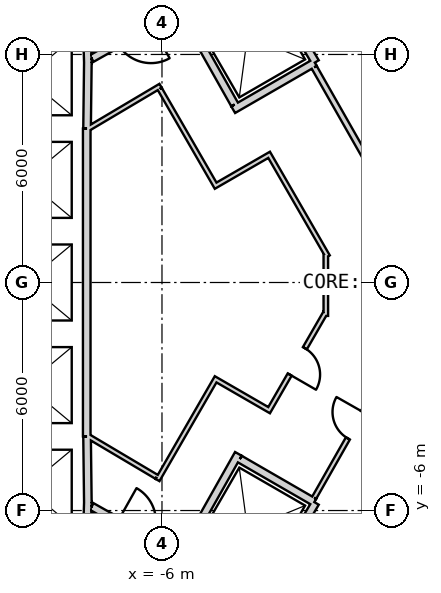
"""IFC4 building model, lengths in metres.
Left out: names, types, materials, properties, quantities, classifications, styles, units other than length and angle.
Written with IfcOpenShell. Run it as: python <this file> out.ifc"""

import sys

from ifc_helpers import new_model, si_unit, direction, frame, frame_2d, origin, place, context, subcontext, project, spatial, rectangle, extrude, element, fill, save


model = new_model("IFC4")
c1 = context("Model", 3, precision=1e-05, world=origin(), true_north=direction((0.0, 1.0)))
c2 = subcontext(c1, "Body", "Model", "MODEL_VIEW")
j1 = project(units=[si_unit("LENGTHUNIT", "METRE"), si_unit("PLANEANGLEUNIT", "RADIAN")], contexts=[c1])
p1 = place(None, origin())
s1 = spatial("IfcSite", under=j1, at=p1, CompositionType="ELEMENT")
p2 = place(p1, origin())
s2 = spatial("IfcBuilding", under=s1, at=p2, CompositionType="ELEMENT")
p3 = place(p2, frame((0.0, 0.0, 70.1)))
s3 = spatial("IfcBuildingStorey", under=s2, at=p3, CompositionType="ELEMENT", Elevation=70.1)
p4 = place(p3, frame((19.475, 2.208, 0.0), z_axis=(0.0, 0.0, 1.0), x_axis=(-0.866028369851, 0.499994862586, 0.0)))
e1 = element("IfcWall", 1, at=p4, inside=s3, PredefinedType="SHEAR", context=c2, shape_type="SweptSolid", body=[
    extrude(rectangle(XDim=31.523, YDim=0.9, at=frame_2d((15.762, 0.0))), origin(), (0.0, 0.0, 1.0), 4.1),
])
p5 = place(p4, frame((7.062, 0.0, 0.0)))
e2 = element("IfcOpeningElement", 2, at=p5, cuts=e1, PredefinedType="OPENING", context=c2, shape_type="SweptSolid", body=[
    extrude(rectangle(XDim=1.2, YDim=2.4, at=frame_2d((0.6, 1.2))), frame((0.0, 0.46, 0.0), z_axis=(0.0, -1.0, 0.0), x_axis=(1.0, 0.0, 0.0)), (0.0, 0.0, 1.0), 0.92),
])
p6 = place(p4, frame((9.762, 0.0, 0.0)))
e3 = element("IfcOpeningElement", 3, at=p6, cuts=e1, PredefinedType="OPENING", context=c2, shape_type="SweptSolid", body=[
    extrude(rectangle(XDim=1.2, YDim=2.4, at=frame_2d((0.6, 1.2))), frame((0.0, 0.46, 0.0), z_axis=(0.0, -1.0, 0.0), x_axis=(1.0, 0.0, 0.0)), (0.0, 0.0, 1.0), 0.92),
])
p7 = place(p4, frame((12.462, 0.0, 0.0)))
e4 = element("IfcOpeningElement", 4, at=p7, cuts=e1, PredefinedType="OPENING", context=c2, shape_type="SweptSolid", body=[
    extrude(rectangle(XDim=1.2, YDim=2.4, at=frame_2d((0.6, 1.2))), frame((0.0, 0.46, 0.0), z_axis=(0.0, -1.0, 0.0), x_axis=(1.0, 0.0, 0.0)), (0.0, 0.0, 1.0), 0.92),
])
p8 = place(p4, frame((15.162, 0.0, 0.0)))
e5 = element("IfcOpeningElement", 5, at=p8, cuts=e1, PredefinedType="OPENING", context=c2, shape_type="SweptSolid", body=[
    extrude(rectangle(XDim=1.2, YDim=2.4, at=frame_2d((0.6, 1.2))), frame((0.0, 0.46, 0.0), z_axis=(0.0, -1.0, 0.0), x_axis=(1.0, 0.0, 0.0)), (0.0, 0.0, 1.0), 0.92),
])
p9 = place(p4, frame((17.862, 0.0, 0.0)))
e6 = element("IfcOpeningElement", 6, at=p9, cuts=e1, PredefinedType="OPENING", context=c2, shape_type="SweptSolid", body=[
    extrude(rectangle(XDim=1.2, YDim=2.4, at=frame_2d((0.6, 1.2))), frame((0.0, 0.46, 0.0), z_axis=(0.0, -1.0, 0.0), x_axis=(1.0, 0.0, 0.0)), (0.0, 0.0, 1.0), 0.92),
])
p10 = place(p4, frame((20.562, 0.0, 0.0)))
e7 = element("IfcOpeningElement", 7, at=p10, cuts=e1, PredefinedType="OPENING", context=c2, shape_type="SweptSolid", body=[
    extrude(rectangle(XDim=1.2, YDim=2.4, at=frame_2d((0.6, 1.2))), frame((0.0, 0.46, 0.0), z_axis=(0.0, -1.0, 0.0), x_axis=(1.0, 0.0, 0.0)), (0.0, 0.0, 1.0), 0.92),
])
p11 = place(p4, frame((23.262, 0.0, 0.0)))
e8 = element("IfcOpeningElement", 8, at=p11, cuts=e1, PredefinedType="OPENING", context=c2, shape_type="SweptSolid", body=[
    extrude(rectangle(XDim=1.2, YDim=2.4, at=frame_2d((0.6, 1.2))), frame((0.0, 0.46, 0.0), z_axis=(0.0, -1.0, 0.0), x_axis=(1.0, 0.0, 0.0)), (0.0, 0.0, 1.0), 0.92),
])
p12 = place(p4, frame((3.612, 0.0, 0.0)))
e9 = element("IfcOpeningElement", 9, at=p12, cuts=e1, PredefinedType="OPENING", context=c2, shape_type="SweptSolid", body=[
    extrude(rectangle(XDim=1.2, YDim=2.4, at=frame_2d((0.6, 1.2))), frame((0.0, 0.46, 0.0), z_axis=(0.0, -1.0, 0.0), x_axis=(1.0, 0.0, 0.0)), (0.0, 0.0, 1.0), 0.92),
])
p13 = place(p4, frame((26.712, 0.0, 0.0)))
e10 = element("IfcOpeningElement", 10, at=p13, cuts=e1, PredefinedType="OPENING", context=c2, shape_type="SweptSolid", body=[
    extrude(rectangle(XDim=1.2, YDim=2.4, at=frame_2d((0.6, 1.2))), frame((0.0, 0.46, 0.0), z_axis=(0.0, -1.0, 0.0), x_axis=(1.0, 0.0, 0.0)), (0.0, 0.0, 1.0), 0.92),
])
p14 = place(p3, frame((-7.825, -17.97, 0.0), z_axis=(0.0, 0.0, 1.0), x_axis=(0.866028369851, 0.499994862586, 0.0)))
e11 = element("IfcWall", 11, at=p14, inside=s3, PredefinedType="SHEAR", context=c2, shape_type="SweptSolid", body=[
    extrude(rectangle(XDim=31.523, YDim=0.9, at=frame_2d((15.762, 0.0))), origin(), (0.0, 0.0, 1.0), 4.1),
])
p15 = place(p14, frame((7.062, 0.0, 0.0)))
e12 = element("IfcOpeningElement", 12, at=p15, cuts=e11, PredefinedType="OPENING", context=c2, shape_type="SweptSolid", body=[
    extrude(rectangle(XDim=1.2, YDim=2.4, at=frame_2d((0.6, 1.2))), frame((0.0, 0.46, 0.0), z_axis=(0.0, -1.0, 0.0), x_axis=(1.0, 0.0, 0.0)), (0.0, 0.0, 1.0), 0.92),
])
p16 = place(p14, frame((9.762, 0.0, 0.0)))
e13 = element("IfcOpeningElement", 13, at=p16, cuts=e11, PredefinedType="OPENING", context=c2, shape_type="SweptSolid", body=[
    extrude(rectangle(XDim=1.2, YDim=2.4, at=frame_2d((0.6, 1.2))), frame((0.0, 0.46, 0.0), z_axis=(0.0, -1.0, 0.0), x_axis=(1.0, 0.0, 0.0)), (0.0, 0.0, 1.0), 0.92),
])
p17 = place(p14, frame((12.462, 0.0, 0.0)))
e14 = element("IfcOpeningElement", 14, at=p17, cuts=e11, PredefinedType="OPENING", context=c2, shape_type="SweptSolid", body=[
    extrude(rectangle(XDim=1.2, YDim=2.4, at=frame_2d((0.6, 1.2))), frame((0.0, 0.46, 0.0), z_axis=(0.0, -1.0, 0.0), x_axis=(1.0, 0.0, 0.0)), (0.0, 0.0, 1.0), 0.92),
])
p18 = place(p14, frame((15.162, 0.0, 0.0)))
e15 = element("IfcOpeningElement", 15, at=p18, cuts=e11, PredefinedType="OPENING", context=c2, shape_type="SweptSolid", body=[
    extrude(rectangle(XDim=1.2, YDim=2.4, at=frame_2d((0.6, 1.2))), frame((0.0, 0.46, 0.0), z_axis=(0.0, -1.0, 0.0), x_axis=(1.0, 0.0, 0.0)), (0.0, 0.0, 1.0), 0.92),
])
p19 = place(p14, frame((17.862, 0.0, 0.0)))
e16 = element("IfcOpeningElement", 16, at=p19, cuts=e11, PredefinedType="OPENING", context=c2, shape_type="SweptSolid", body=[
    extrude(rectangle(XDim=1.2, YDim=2.4, at=frame_2d((0.6, 1.2))), frame((0.0, 0.46, 0.0), z_axis=(0.0, -1.0, 0.0), x_axis=(1.0, 0.0, 0.0)), (0.0, 0.0, 1.0), 0.92),
])
p20 = place(p14, frame((20.562, 0.0, 0.0)))
e17 = element("IfcOpeningElement", 17, at=p20, cuts=e11, PredefinedType="OPENING", context=c2, shape_type="SweptSolid", body=[
    extrude(rectangle(XDim=1.2, YDim=2.4, at=frame_2d((0.6, 1.2))), frame((0.0, 0.46, 0.0), z_axis=(0.0, -1.0, 0.0), x_axis=(1.0, 0.0, 0.0)), (0.0, 0.0, 1.0), 0.92),
])
p21 = place(p14, frame((26.712, 0.0, 0.0)))
e18 = element("IfcOpeningElement", 18, at=p21, cuts=e11, PredefinedType="OPENING", context=c2, shape_type="SweptSolid", body=[
    extrude(rectangle(XDim=1.2, YDim=2.4, at=frame_2d((0.6, 1.2))), frame((0.0, 0.46, 0.0), z_axis=(0.0, -1.0, 0.0), x_axis=(1.0, 0.0, 0.0)), (0.0, 0.0, 1.0), 0.92),
])
p22 = place(p14, frame((3.612, 0.0, 0.0)))
e19 = element("IfcOpeningElement", 19, at=p22, cuts=e11, PredefinedType="OPENING", context=c2, shape_type="SweptSolid", body=[
    extrude(rectangle(XDim=1.2, YDim=2.4, at=frame_2d((0.6, 1.2))), frame((0.0, 0.46, 0.0), z_axis=(0.0, -1.0, 0.0), x_axis=(1.0, 0.0, 0.0)), (0.0, 0.0, 1.0), 0.92),
])
p23 = place(p3, frame((-7.977, 6.65, 0.0), z_axis=(0.0, 0.0, 1.0), x_axis=(0.030861509705, -0.999523670164, 0.0)))
e20 = element("IfcWall", 20, at=p23, inside=s3, PredefinedType="PLUMBINGWALL", context=c2, shape_type="SweptSolid", body=[
    extrude(rectangle(XDim=0.878, YDim=0.2, at=frame_2d((0.439, 0.0))), origin(), (0.0, 0.0, 1.0), 3.8),
])
p24 = place(p3, frame((-7.949, 5.895, 0.0), z_axis=(0.0, 0.0, 1.0), x_axis=(-0.012042535896, -0.999927486035, 0.0)))
e21 = element("IfcWall", 21, at=p24, inside=s3, PredefinedType="PLUMBINGWALL", context=c2, shape_type="SweptSolid", body=[
    extrude(rectangle(XDim=1.845, YDim=0.2, at=frame_2d((0.922, 0.0))), origin(), (0.0, 0.0, 1.0), 3.8),
])
p25 = place(p3, frame((-7.98, 4.05, 0.0), z_axis=(0.0, 0.0, 1.0), x_axis=(0.0, -1.0, 0.0)))
e22 = element("IfcWall", 22, at=p25, inside=s3, PredefinedType="PLUMBINGWALL", context=c2, shape_type="SweptSolid", body=[
    extrude(rectangle(XDim=8.1, YDim=0.2, at=frame_2d((4.05, 0.0))), origin(), (0.0, 0.0, 1.0), 3.8),
])
p26 = place(p3, frame((-7.95, -5.772, 0.0), z_axis=(0.0, 0.0, 1.0), x_axis=(-0.030803413295, -0.999525462272, 0.0)))
e23 = element("IfcWall", 23, at=p26, inside=s3, PredefinedType="PLUMBINGWALL", context=c2, shape_type="SweptSolid", body=[
    extrude(rectangle(XDim=1.078, YDim=0.2, at=frame_2d((0.539, 0.0))), origin(), (0.0, 0.0, 1.0), 3.8),
])
p27 = place(p3, frame((-7.971, -4.05, 0.0), z_axis=(0.0, 0.0, 1.0), x_axis=(0.012042535896, -0.999927486035, 0.0)))
e24 = element("IfcWall", 24, at=p27, inside=s3, PredefinedType="PLUMBINGWALL", context=c2, shape_type="SweptSolid", body=[
    extrude(rectangle(XDim=1.845, YDim=0.2, at=frame_2d((0.922, 0.0))), origin(), (0.0, 0.0, 1.0), 3.8),
])
p28 = place(p3, frame((-3.538, 8.465, 0.0), z_axis=(0.0, 0.0, 1.0), x_axis=(0.508647062354, -0.860975125052, 0.0)))
e25 = element("IfcWall", 25, at=p28, inside=s3, PredefinedType="PLUMBINGWALL", context=c2, shape_type="SweptSolid", body=[
    extrude(rectangle(XDim=3.1, YDim=0.2, at=frame_2d((1.55, 0.0))), origin(), (0.0, 0.0, 1.0), 3.8),
])
p29 = place(p3, frame((-1.979, 5.786, 0.0), z_axis=(0.0, 0.0, 1.0), x_axis=(-0.866016689309, -0.500015093611, 0.0)))
e26 = element("IfcWall", 26, at=p29, inside=s3, PredefinedType="PLUMBINGWALL", context=c2, shape_type="SweptSolid", body=[
    extrude(rectangle(XDim=2.479, YDim=0.2, at=frame_2d((1.24, 0.0))), origin(), (0.0, 0.0, 1.0), 3.8),
])
p30 = place(p3, frame((-5.562, 7.296, 0.0), z_axis=(0.0, 0.0, 1.0), x_axis=(0.49134651263, -0.870964180966, 0.0)))
e27 = element("IfcWall", 27, at=p30, inside=s3, PredefinedType="PLUMBINGWALL", context=c2, shape_type="SweptSolid", body=[
    extrude(rectangle(XDim=3.0, YDim=0.2, at=frame_2d((1.5, 0.0))), origin(), (0.0, 0.0, 1.0), 3.8),
])
p31 = place(p3, frame((-1.961, -5.796, 0.0), z_axis=(0.0, 0.0, 1.0), x_axis=(-0.508647062354, -0.860975125052, 0.0)))
e28 = element("IfcWall", 28, at=p31, inside=s3, PredefinedType="PLUMBINGWALL", context=c2, shape_type="SweptSolid", body=[
    extrude(rectangle(XDim=3.1, YDim=0.2, at=frame_2d((1.55, 0.0))), origin(), (0.0, 0.0, 1.0), 3.8),
])
p32 = place(p3, frame((-3.99, -4.509, 0.0), z_axis=(0.0, 0.0, 1.0), x_axis=(-0.491358283181, -0.870957540612, 0.0)))
e29 = element("IfcWall", 29, at=p32, inside=s3, PredefinedType="PLUMBINGWALL", context=c2, shape_type="SweptSolid", body=[
    extrude(rectangle(XDim=3.2, YDim=0.2, at=frame_2d((1.6, 0.0))), origin(), (0.0, 0.0, 1.0), 3.8),
])
p33 = place(p3, frame((-3.953, -4.646, 0.0), z_axis=(0.0, 0.0, 1.0), x_axis=(0.866065302921, -0.4999308863, 0.0)))
e30 = element("IfcWall", 30, at=p33, inside=s3, PredefinedType="PLUMBINGWALL", context=c2, shape_type="SweptSolid", body=[
    extrude(rectangle(XDim=2.264, YDim=0.2, at=frame_2d((1.132, 0.0))), origin(), (0.0, 0.0, 1.0), 3.8),
])
p34 = place(p3, frame((-5.6, 7.16, 0.0), z_axis=(0.0, 0.0, 1.0), x_axis=(-0.871363259478, -0.490638431059, 0.0)))
e31 = element("IfcWall", 31, at=p34, inside=s3, PredefinedType="PARTITIONING", context=c2, shape_type="SweptSolid", body=[
    extrude(rectangle(XDim=2.581, YDim=0.2, at=frame_2d((1.291, 0.0))), origin(), (0.0, 0.0, 1.0), 3.8),
])
p35 = place(p34, frame((0.791, 0.0, 0.0)))
e32 = element("IfcOpeningElement", 32, at=p35, cuts=e31, PredefinedType="OPENING", context=c2, shape_type="SweptSolid", body=[
    extrude(rectangle(XDim=1.0, YDim=2.1, at=frame_2d((0.5, 1.05))), frame((0.0, 0.11, 0.0), z_axis=(0.0, -1.0, 0.0), x_axis=(1.0, 0.0, 0.0)), (0.0, 0.0, 1.0), 0.22),
])
p36 = place(p3, frame((-7.849, -5.894, 0.0), z_axis=(0.0, 0.0, 1.0), x_axis=(0.871363259478, -0.490638431059, 0.0)))
e33 = element("IfcWall", 33, at=p36, inside=s3, PredefinedType="PARTITIONING", context=c2, shape_type="SweptSolid", body=[
    extrude(rectangle(XDim=2.581, YDim=0.2, at=frame_2d((1.291, 0.0))), origin(), (0.0, 0.0, 1.0), 3.8),
])
p37 = place(p36, frame((0.791, 0.0, 0.0)))
e34 = element("IfcOpeningElement", 34, at=p37, cuts=e33, PredefinedType="OPENING", context=c2, shape_type="SweptSolid", body=[
    extrude(rectangle(XDim=1.0, YDim=2.1, at=frame_2d((0.5, 1.05))), frame((0.0, 0.11, 0.0), z_axis=(0.0, -1.0, 0.0), x_axis=(1.0, 0.0, 0.0)), (0.0, 0.0, 1.0), 0.22),
])
p38 = place(p3, frame((-1.994, 5.661, 0.0), z_axis=(0.0, 0.0, 1.0), x_axis=(0.494341211302, -0.869267948798, 0.0)))
e35 = element("IfcWall", 35, at=p38, inside=s3, PredefinedType="PLUMBINGWALL", context=c2, shape_type="SweptSolid", body=[
    extrude(rectangle(XDim=4.361, YDim=0.15, at=frame_2d((2.18, 0.0))), origin(), (0.0, 0.0, 1.0), 3.8),
])
p39 = place(p3, frame((0.224, -1.761, 0.0), z_axis=(0.0, 0.0, 1.0), x_axis=(-0.494327216836, -0.869275907118, 0.0)))
e36 = element("IfcWall", 36, at=p39, inside=s3, PredefinedType="PARTITIONING", context=c2, shape_type="SweptSolid", body=[
    extrude(rectangle(XDim=4.487, YDim=0.12, at=frame_2d((2.244, 0.0))), origin(), (0.0, 0.0, 1.0), 3.8),
])
p40 = place(p39, frame((1.895, 0.0, 0.0)))
e37 = element("IfcOpeningElement", 37, at=p40, cuts=e36, PredefinedType="OPENING", context=c2, shape_type="SweptSolid", body=[
    extrude(rectangle(XDim=0.8, YDim=2.1, at=frame_2d((0.4, 1.05))), frame((0.0, 0.07, 0.0), z_axis=(0.0, -1.0, 0.0), x_axis=(1.0, 0.0, 0.0)), (0.0, 0.0, 1.0), 0.14),
])
p41 = place(p3, frame((-6.037, 5.176, 0.0), z_axis=(0.0, 0.0, 1.0), x_axis=(-0.860106072674, -0.510115225953, 0.0)))
e38 = element("IfcWall", 38, at=p41, inside=s3, PredefinedType="PARTITIONING", context=c2, shape_type="SweptSolid", body=[
    extrude(rectangle(XDim=2.225, YDim=0.12, at=frame_2d((1.112, 0.0))), origin(), (0.0, 0.0, 1.0), 3.8),
])
p42 = place(p3, frame((-4.558, 2.495, 0.0), z_axis=(0.0, 0.0, 1.0), x_axis=(-0.499990139034, 0.866031096941, 0.0)))
e39 = element("IfcWall", 39, at=p42, inside=s3, PredefinedType="PARTITIONING", context=c2, shape_type="SweptSolid", body=[
    extrude(rectangle(XDim=3.0, YDim=0.12, at=frame_2d((1.5, 0.0))), origin(), (0.0, 0.0, 1.0), 3.8),
])
p43 = place(p3, frame((-3.129, 3.39, 0.0), z_axis=(0.0, 0.0, 1.0), x_axis=(-0.866053003207, -0.499952193351, 0.0)))
e40 = element("IfcWall", 40, at=p43, inside=s3, PredefinedType="PARTITIONING", context=c2, shape_type="SweptSolid", body=[
    extrude(rectangle(XDim=1.625, YDim=0.12, at=frame_2d((0.812, 0.0))), origin(), (0.0, 0.0, 1.0), 3.8),
])
p44 = place(p3, frame((-1.637, 0.685, 0.0), z_axis=(0.0, 0.0, 1.0), x_axis=(-0.500006252586, 0.866021793822, 0.0)))
e41 = element("IfcWall", 41, at=p44, inside=s3, PredefinedType="PARTITIONING", context=c2, shape_type="SweptSolid", body=[
    extrude(rectangle(XDim=3.028, YDim=0.12, at=frame_2d((1.514, 0.0))), origin(), (0.0, 0.0, 1.0), 3.8),
])
p45 = place(p3, frame((-1.689, -0.879, 0.0), z_axis=(0.0, 0.0, 1.0), x_axis=(0.0, 1.0, 0.0)))
e42 = element("IfcWall", 42, at=p45, inside=s3, PredefinedType="PARTITIONING", context=c2, shape_type="SweptSolid", body=[
    extrude(rectangle(XDim=1.635, YDim=0.12, at=frame_2d((0.818, 0.0))), origin(), (0.0, 0.0, 1.0), 3.8),
])
p46 = place(p3, frame((-3.211, -3.412, 0.0), z_axis=(0.0, 0.0, 1.0), x_axis=(0.499983190554, 0.866035108505, 0.0)))
e43 = element("IfcWall", 43, at=p46, inside=s3, PredefinedType="PARTITIONING", context=c2, shape_type="SweptSolid", body=[
    extrude(rectangle(XDim=3.026, YDim=0.12, at=frame_2d((1.513, 0.0))), origin(), (0.0, 0.0, 1.0), 3.8),
])
p47 = place(p46, frame((1.143, 0.0, 0.0)))
e44 = element("IfcOpeningElement", 44, at=p47, cuts=e43, PredefinedType="OPENING", context=c2, shape_type="SweptSolid", body=[
    extrude(rectangle(XDim=0.8, YDim=2.1, at=frame_2d((0.4, 1.05))), frame((0.0, 0.07, 0.0), z_axis=(0.0, -1.0, 0.0), x_axis=(1.0, 0.0, 0.0)), (0.0, 0.0, 1.0), 0.14),
])
p48 = place(p3, frame((-4.64, -2.517, 0.0), z_axis=(0.0, 0.0, 1.0), x_axis=(0.866015446554, -0.500017246033, 0.0)))
e45 = element("IfcWall", 45, at=p48, inside=s3, PredefinedType="PARTITIONING", context=c2, shape_type="SweptSolid", body=[
    extrude(rectangle(XDim=1.625, YDim=0.12, at=frame_2d((0.812, 0.0))), origin(), (0.0, 0.0, 1.0), 3.8),
])
p49 = place(p3, frame((-6.118, -5.197, 0.0), z_axis=(0.0, 0.0, 1.0), x_axis=(0.499990139034, 0.866031096941, 0.0)))
e46 = element("IfcWall", 46, at=p49, inside=s3, PredefinedType="PARTITIONING", context=c2, shape_type="SweptSolid", body=[
    extrude(rectangle(XDim=3.0, YDim=0.12, at=frame_2d((1.5, 0.0))), origin(), (0.0, 0.0, 1.0), 3.8),
])
p50 = place(p3, frame((-7.95, -4.041, 0.0), z_axis=(0.0, 0.0, 1.0), x_axis=(0.860112457103, -0.510104461004, 0.0)))
e47 = element("IfcWall", 47, at=p50, inside=s3, PredefinedType="PARTITIONING", context=c2, shape_type="SweptSolid", body=[
    extrude(rectangle(XDim=2.104, YDim=0.12, at=frame_2d((1.052, 0.0))), origin(), (0.0, 0.0, 1.0), 3.8),
])
p51 = place(p40, origin())
e48 = element("IfcDoor", 48, at=p51, inside=s3, OperationType="SINGLE_SWING_LEFT", PredefinedType="USERDEFINED", context=c2, shape_type="SweptSolid", body=[
    extrude(rectangle(XDim=0.8, YDim=2.1, at=frame_2d((0.4, 1.05))), frame((0.0, 0.025, 0.0), z_axis=(0.0, -1.0, 0.0), x_axis=(1.0, 0.0, 0.0)), (0.0, 0.0, 1.0), 0.05),
])
fill(e37, e48)
p52 = place(p47, origin())
e49 = element("IfcDoor", 49, at=p52, inside=s3, OperationType="SINGLE_SWING_LEFT", PredefinedType="USERDEFINED", context=c2, shape_type="SweptSolid", body=[
    extrude(rectangle(XDim=0.8, YDim=2.1, at=frame_2d((0.4, 1.05))), frame((0.0, 0.025, 0.0), z_axis=(0.0, -1.0, 0.0), x_axis=(1.0, 0.0, 0.0)), (0.0, 0.0, 1.0), 0.05),
])
fill(e44, e49)
save(model, sys.argv[1])
